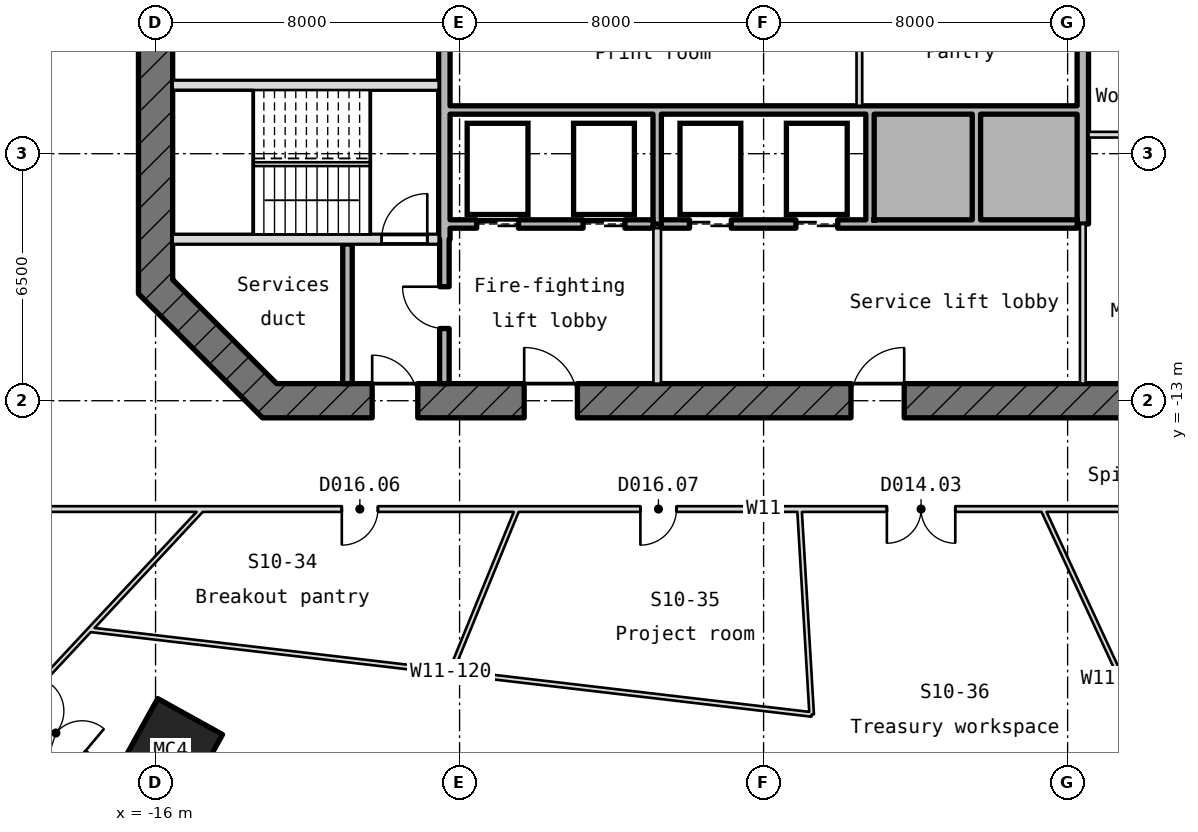
"""IFC4 building model, lengths in metres.
Left out: names, types, materials, properties, quantities, classifications, styles, units other than length and angle.
Written with IfcOpenShell. Run it as: python <this file> out.ifc"""

import sys

from ifc_helpers import new_model, si_unit, direction, frame, frame_2d, origin, origin_2d, place, context, subcontext, project, spatial, rectangle, hollow_rectangle, extrude, element, fill, save


model = new_model("IFC4")
c1 = context("Model", 3, precision=1e-05, world=origin(), true_north=direction((0.0, 1.0)))
c2 = subcontext(c1, "Body", "Model", "MODEL_VIEW")
j1 = project(units=[si_unit("LENGTHUNIT", "METRE"), si_unit("PLANEANGLEUNIT", "RADIAN")], contexts=[c1])
p1 = place(None, origin())
s1 = spatial("IfcSite", under=j1, at=p1, CompositionType="ELEMENT")
p2 = place(p1, origin())
s2 = spatial("IfcBuilding", under=s1, at=p2, CompositionType="ELEMENT")
p3 = place(p2, frame((0.0, 0.0, 161.05)))
s3 = spatial("IfcBuildingStorey", under=s2, at=p3, CompositionType="ELEMENT", Elevation=161.05)
p4 = place(p3, frame((-15.6, -22.228, -0.18), z_axis=(0.0, 0.0, 1.0), x_axis=(-0.874380139328, 0.485241560409, 0.0)))
e1 = element("IfcColumn", 1, at=p4, inside=s3, PredefinedType="COLUMN", context=c2, shape_type="SweptSolid", body=[
    extrude(hollow_rectangle(XDim=1.95, YDim=2.1, WallThickness=0.075, at=origin_2d()), origin(), (0.0, 0.0, 1.0), 4.15),
])
p5 = place(p3, frame((-25.554, -15.929, 0.0), z_axis=(0.0, 0.0, 1.0), x_axis=(0.766186960617, -0.642617725697, 0.0)))
e2 = element("IfcWall", 2, at=p5, inside=s3, PredefinedType="SOLIDWALL", context=c2, shape_type="SweptSolid", body=[
    extrude(rectangle(XDim=11.846, YDim=0.3, at=frame_2d((5.923, 0.0))), origin(), (0.0, 0.0, 1.0), 3.97),
])
p6 = place(p5, frame((8.146, 0.0, 0.0)))
e3 = element("IfcOpeningElement", 3, at=p6, cuts=e2, PredefinedType="OPENING", context=c2, shape_type="SweptSolid", body=[
    extrude(rectangle(XDim=1.8, YDim=2.4, at=frame_2d((0.9, 1.2))), frame((0.0, 0.16, 0.0), z_axis=(0.0, -1.0, 0.0), x_axis=(1.0, 0.0, 0.0)), (0.0, 0.0, 1.0), 0.32),
])
p7 = place(p5, frame((5.546, 0.0, 0.9)))
e4 = element("IfcOpeningElement", 4, at=p7, cuts=e2, PredefinedType="OPENING", context=c2, shape_type="SweptSolid", body=[
    extrude(rectangle(XDim=2.0, YDim=1.5, at=frame_2d((1.0, 0.75))), frame((0.0, 0.16, 0.0), z_axis=(0.0, -1.0, 0.0), x_axis=(1.0, 0.0, 0.0)), (0.0, 0.0, 1.0), 0.32),
])
p8 = place(p3, frame((-16.0, 10.186, -0.18), z_axis=(0.0, 0.0, 1.0), x_axis=(0.0, -1.0, 0.0)))
e5 = element("IfcWall", 5, at=p8, inside=s3, PredefinedType="SHEAR", context=c2, shape_type="SweptSolid", body=[
    extrude(rectangle(XDim=20.373, YDim=0.9, at=frame_2d((10.186, 0.0))), origin(), (0.0, 0.0, 1.0), 4.15),
])
p9 = place(p8, frame((8.986, 0.0, 0.18)))
e6 = element("IfcOpeningElement", 6, at=p9, cuts=e5, PredefinedType="OPENING", context=c2, shape_type="SweptSolid", body=[
    extrude(rectangle(XDim=2.4, YDim=2.1, at=frame_2d((1.2, 1.05))), frame((0.0, 0.46, 0.0), z_axis=(0.0, -1.0, 0.0), x_axis=(1.0, 0.0, 0.0)), (0.0, 0.0, 1.0), 0.92),
])
p10 = place(p8, frame((5.586, 0.0, 0.18)))
e7 = element("IfcOpeningElement", 7, at=p10, cuts=e5, PredefinedType="OPENING", context=c2, shape_type="SweptSolid", body=[
    extrude(rectangle(XDim=1.2, YDim=2.1, at=frame_2d((0.6, 1.05))), frame((0.0, 0.46, 0.0), z_axis=(0.0, -1.0, 0.0), x_axis=(1.0, 0.0, 0.0)), (0.0, 0.0, 1.0), 0.92),
])
p11 = place(p3, frame((-16.132, -9.868, -0.18), z_axis=(0.0, 0.0, 1.0), x_axis=(0.707106781187, -0.707106781187, 0.0)))
e8 = element("IfcWall", 8, at=p11, inside=s3, PredefinedType="SHEAR", context=c2, shape_type="SweptSolid", body=[
    extrude(rectangle(XDim=4.615, YDim=0.9, at=frame_2d((2.308, 0.0))), origin(), (0.0, 0.0, 1.0), 4.15),
])
p12 = place(p3, frame((-13.186, -13.0, -0.18), z_axis=(0.0, 0.0, 1.0), x_axis=(1.0, 0.0, 0.0)))
e9 = element("IfcWall", 9, at=p12, inside=s3, PredefinedType="SHEAR", context=c2, shape_type="SweptSolid", body=[
    extrude(rectangle(XDim=26.373, YDim=0.9, at=frame_2d((13.186, 0.0))), origin(), (0.0, 0.0, 1.0), 4.15),
])
p13 = place(p12, frame((2.886, 0.0, 0.18)))
e10 = element("IfcOpeningElement", 10, at=p13, cuts=e9, PredefinedType="OPENING", context=c2, shape_type="SweptSolid", body=[
    extrude(rectangle(XDim=1.2, YDim=2.1, at=frame_2d((0.6, 1.05))), frame((0.0, 0.46, 0.0), z_axis=(0.0, -1.0, 0.0), x_axis=(1.0, 0.0, 0.0)), (0.0, 0.0, 1.0), 0.92),
])
p14 = place(p12, frame((6.886, 0.0, 0.18)))
e11 = element("IfcOpeningElement", 11, at=p14, cuts=e9, PredefinedType="OPENING", context=c2, shape_type="SweptSolid", body=[
    extrude(rectangle(XDim=1.4, YDim=2.1, at=frame_2d((0.7, 1.05))), frame((0.0, 0.46, 0.0), z_axis=(0.0, -1.0, 0.0), x_axis=(1.0, 0.0, 0.0)), (0.0, 0.0, 1.0), 0.92),
])
p15 = place(p12, frame((15.486, 0.0, 0.18)))
e12 = element("IfcOpeningElement", 12, at=p15, cuts=e9, PredefinedType="OPENING", context=c2, shape_type="SweptSolid", body=[
    extrude(rectangle(XDim=1.4, YDim=2.1, at=frame_2d((0.7, 1.05))), frame((0.0, 0.46, 0.0), z_axis=(0.0, -1.0, 0.0), x_axis=(1.0, 0.0, 0.0)), (0.0, 0.0, 1.0), 0.92),
])
p16 = place(p3, frame((-15.55, -8.75, -0.18), z_axis=(0.0, 0.0, 1.0), x_axis=(1.0, 0.0, 0.0)))
e13 = element("IfcWall", 13, at=p16, inside=s3, PredefinedType="SHEAR", context=c2, shape_type="SweptSolid", body=[
    extrude(rectangle(XDim=7.0, YDim=0.25, at=frame_2d((3.5, 0.0))), origin(), (0.0, 0.0, 1.0), 4.15),
])
p17 = place(p16, frame((5.5, 0.0, 0.18)))
e14 = element("IfcOpeningElement", 14, at=p17, cuts=e13, PredefinedType="OPENING", context=c2, shape_type="SweptSolid", body=[
    extrude(rectangle(XDim=1.2, YDim=2.1, at=frame_2d((0.6, 1.05))), frame((0.0, 0.135, 0.0), z_axis=(0.0, -1.0, 0.0), x_axis=(1.0, 0.0, 0.0)), (0.0, 0.0, 1.0), 0.27),
])
p18 = place(p3, frame((-8.25, -8.35, 0.0), z_axis=(0.0, 0.0, 1.0), x_axis=(1.0, 0.0, 0.0)))
e15 = element("IfcWall", 15, at=p18, inside=s3, PredefinedType="STANDARD", context=c2, shape_type="SweptSolid", body=[
    extrude(rectangle(XDim=5.34, YDim=0.22, at=frame_2d((2.67, 0.0))), origin(), (0.0, 0.0, 1.0), 3.97),
])
p19 = place(p18, frame((0.7, 0.0, 0.0)))
e16 = element("IfcOpeningElement", 16, at=p19, cuts=e15, PredefinedType="OPENING", context=c2, shape_type="SweptSolid", body=[
    extrude(rectangle(XDim=1.1, YDim=2.1, at=frame_2d((0.55, 1.05))), frame((0.0, 0.12, 0.0), z_axis=(0.0, -1.0, 0.0), x_axis=(1.0, 0.0, 0.0)), (0.0, 0.0, 1.0), 0.24),
])
p20 = place(p18, frame((3.5, 0.0, 0.0)))
e17 = element("IfcOpeningElement", 17, at=p20, cuts=e15, PredefinedType="OPENING", context=c2, shape_type="SweptSolid", body=[
    extrude(rectangle(XDim=1.1, YDim=2.1, at=frame_2d((0.55, 1.05))), frame((0.0, 0.12, 0.0), z_axis=(0.0, -1.0, 0.0), x_axis=(1.0, 0.0, 0.0)), (0.0, 0.0, 1.0), 0.24),
])
p21 = place(p3, frame((-2.69, -8.35, 0.0), z_axis=(0.0, 0.0, 1.0), x_axis=(1.0, 0.0, 0.0)))
e18 = element("IfcWall", 18, at=p21, inside=s3, PredefinedType="STANDARD", context=c2, shape_type="SweptSolid", body=[
    extrude(rectangle(XDim=10.94, YDim=0.22, at=frame_2d((5.47, 0.0))), origin(), (0.0, 0.0, 1.0), 3.97),
])
p22 = place(p21, frame((0.74, 0.0, 0.0)))
e19 = element("IfcOpeningElement", 19, at=p22, cuts=e18, PredefinedType="OPENING", context=c2, shape_type="SweptSolid", body=[
    extrude(rectangle(XDim=1.1, YDim=2.1, at=frame_2d((0.55, 1.05))), frame((0.0, 0.12, 0.0), z_axis=(0.0, -1.0, 0.0), x_axis=(1.0, 0.0, 0.0)), (0.0, 0.0, 1.0), 0.24),
])
p23 = place(p21, frame((3.54, 0.0, 0.0)))
e20 = element("IfcOpeningElement", 20, at=p23, cuts=e18, PredefinedType="OPENING", context=c2, shape_type="SweptSolid", body=[
    extrude(rectangle(XDim=1.1, YDim=2.1, at=frame_2d((0.55, 1.05))), frame((0.0, 0.12, 0.0), z_axis=(0.0, -1.0, 0.0), x_axis=(1.0, 0.0, 0.0)), (0.0, 0.0, 1.0), 0.24),
])
p24 = place(p3, frame((8.55, -6.0, 0.0), z_axis=(0.0, 0.0, 1.0), x_axis=(1.0, 0.0, 0.0)))
e21 = element("IfcWall", 21, at=p24, inside=s3, PredefinedType="PARTITIONING", context=c2, shape_type="SweptSolid", body=[
    extrude(rectangle(XDim=4.075, YDim=0.15, at=frame_2d((2.038, 0.0))), origin(), (0.0, 0.0, 1.0), 3.97),
])
p25 = place(p3, frame((-8.25, -5.35, 0.0), z_axis=(0.0, 0.0, 1.0), x_axis=(1.0, 0.0, 0.0)))
e22 = element("IfcWall", 22, at=p25, inside=s3, PredefinedType="STANDARD", context=c2, shape_type="SweptSolid", body=[
    extrude(rectangle(XDim=16.5, YDim=0.22, at=frame_2d((8.25, 0.0))), origin(), (0.0, 0.0, 1.0), 3.97),
])
p26 = place(p3, frame((-15.55, -4.7, -0.18), z_axis=(0.0, 0.0, 1.0), x_axis=(1.0, 0.0, 0.0)))
e23 = element("IfcWall", 23, at=p26, inside=s3, PredefinedType="SHEAR", context=c2, shape_type="SweptSolid", body=[
    extrude(rectangle(XDim=7.0, YDim=0.25, at=frame_2d((3.5, 0.0))), origin(), (0.0, 0.0, 1.0), 4.15),
])
p27 = place(p3, frame((-10.95, -12.55, 0.0), z_axis=(0.0, 0.0, 1.0), x_axis=(0.0, 1.0, 0.0)))
e24 = element("IfcWall", 24, at=p27, inside=s3, PredefinedType="STANDARD", context=c2, shape_type="SweptSolid", body=[
    extrude(rectangle(XDim=3.675, YDim=0.25, at=frame_2d((1.837, 0.0))), origin(), (0.0, 0.0, 1.0), 3.97),
])
p28 = place(p3, frame((-8.4, -12.55, 0.0), z_axis=(0.0, 0.0, 1.0), x_axis=(0.0, 1.0, 0.0)))
e25 = element("IfcWall", 25, at=p28, inside=s3, PredefinedType="STANDARD", context=c2, shape_type="SweptSolid", body=[
    extrude(rectangle(XDim=3.8, YDim=0.25, at=frame_2d((1.9, 0.0))), origin(), (0.0, 0.0, 1.0), 3.97),
])
p29 = place(p28, frame((1.45, 0.0, 0.0)))
e26 = element("IfcOpeningElement", 26, at=p29, cuts=e25, PredefinedType="OPENING", context=c2, shape_type="SweptSolid", body=[
    extrude(rectangle(XDim=1.1, YDim=2.1, at=frame_2d((0.55, 1.05))), frame((0.0, 0.135, 0.0), z_axis=(0.0, -1.0, 0.0), x_axis=(1.0, 0.0, 0.0)), (0.0, 0.0, 1.0), 0.27),
])
p30 = place(p3, frame((-8.4, -8.75, -0.18), z_axis=(0.0, 0.0, 1.0), x_axis=(0.0, 1.0, 0.0)))
e27 = element("IfcWall", 27, at=p30, inside=s3, PredefinedType="SHEAR", context=c2, shape_type="SweptSolid", body=[
    extrude(rectangle(XDim=6.25, YDim=0.3, at=frame_2d((3.125, 0.0))), origin(), (0.0, 0.0, 1.0), 4.15),
])
p31 = place(p3, frame((-2.8, -12.55, 0.0), z_axis=(0.0, 0.0, 1.0), x_axis=(0.0, 1.0, 0.0)))
e28 = element("IfcWall", 28, at=p31, inside=s3, PredefinedType="PARTITIONING", context=c2, shape_type="SweptSolid", body=[
    extrude(rectangle(XDim=4.09, YDim=0.2, at=frame_2d((2.045, 0.0))), origin(), (0.0, 0.0, 1.0), 3.97),
])
p32 = place(p3, frame((-2.8, -8.35, 0.0), z_axis=(0.0, 0.0, 1.0), x_axis=(0.0, 1.0, 0.0)))
e29 = element("IfcWall", 29, at=p32, inside=s3, PredefinedType="STANDARD", context=c2, shape_type="SweptSolid", body=[
    extrude(rectangle(XDim=2.89, YDim=0.22, at=frame_2d((1.445, 0.0))), origin(), (0.0, 0.0, 1.0), 3.97),
])
p33 = place(p3, frame((2.52, -5.24, 0.0), z_axis=(0.0, 0.0, 1.0), x_axis=(0.0, 1.0, 0.0)))
e30 = element("IfcWall", 30, at=p33, inside=s3, PredefinedType="PARTITIONING", context=c2, shape_type="SweptSolid", body=[
    extrude(rectangle(XDim=2.74, YDim=0.15, at=frame_2d((1.37, 0.0))), origin(), (0.0, 0.0, 1.0), 3.97),
])
for number, where, z_axis, x_axis in (
    (31, (2.8, -8.24, 0.0), (0.0, 0.0, 1.0), (0.0, 1.0, 0.0)),
    (32, (5.6, -8.24, 0.0), (0.0, 0.0, 1.0), (0.0, 1.0, 0.0)),
):
    element("IfcWall", number, at=place(p3, frame(where, z_axis=z_axis, x_axis=x_axis)), inside=s3, PredefinedType="STANDARD", context=c2, shape_type="SweptSolid", body=[
        extrude(rectangle(XDim=2.78, YDim=0.22, at=frame_2d((1.39, 0.0))), origin(), (0.0, 0.0, 1.0), 3.97),
    ])
p34 = place(p3, frame((8.4, -12.55, 0.0), z_axis=(0.0, 0.0, 1.0), x_axis=(0.0, 1.0, 0.0)))
e33 = element("IfcWall", 33, at=p34, inside=s3, PredefinedType="PARTITIONING", context=c2, shape_type="SweptSolid", body=[
    extrude(rectangle(XDim=4.2, YDim=0.15, at=frame_2d((2.1, 0.0))), origin(), (0.0, 0.0, 1.0), 3.97),
])
p35 = place(p3, frame((8.4, -8.35, -0.18), z_axis=(0.0, 0.0, 1.0), x_axis=(0.0, 1.0, 0.0)))
e34 = element("IfcWall", 34, at=p35, inside=s3, PredefinedType="SHEAR", context=c2, shape_type="SweptSolid", body=[
    extrude(rectangle(XDim=5.85, YDim=0.3, at=frame_2d((2.925, 0.0))), origin(), (0.0, 0.0, 1.0), 4.15),
])
p36 = place(p3, frame((-17.729, -19.025, 0.0), z_axis=(0.0, 0.0, 1.0), x_axis=(0.99318471995, -0.116550899001, 0.0)))
e35 = element("IfcWall", 35, at=p36, inside=s3, PredefinedType="PARTITIONING", context=c2, shape_type="SweptSolid", body=[
    extrude(rectangle(XDim=19.125, YDim=0.12, at=frame_2d((9.562, 0.0))), origin(), (0.0, 0.0, 1.0), 3.97),
])
p37 = place(p3, frame((-14.77, -15.85, 0.0), z_axis=(0.0, 0.0, 1.0), x_axis=(-0.681748932873, -0.731586216742, 0.0)))
e36 = element("IfcWall", 36, at=p37, inside=s3, PredefinedType="PARTITIONING", context=c2, shape_type="SweptSolid", body=[
    extrude(rectangle(XDim=7.0, YDim=0.12, at=frame_2d((3.5, 0.0))), origin(), (0.0, 0.0, 1.0), 3.97),
])
p38 = place(p3, frame((-8.232, -20.14, 0.0), z_axis=(0.0, 0.0, 1.0), x_axis=(0.378310762155, 0.925678652253, 0.0)))
e37 = element("IfcWall", 37, at=p38, inside=s3, PredefinedType="PARTITIONING", context=c2, shape_type="SweptSolid", body=[
    extrude(rectangle(XDim=4.634, YDim=0.12, at=frame_2d((2.317, 0.0))), origin(), (0.0, 0.0, 1.0), 3.97),
])
p39 = place(p3, frame((1.265, -21.254, 0.0), z_axis=(0.0, 0.0, 1.0), x_axis=(-0.059435758529, 0.998232132627, 0.0)))
e38 = element("IfcWall", 38, at=p39, inside=s3, PredefinedType="PARTITIONING", context=c2, shape_type="SweptSolid", body=[
    extrude(rectangle(XDim=5.414, YDim=0.12, at=frame_2d((2.707, 0.0))), origin(), (0.0, 0.0, 1.0), 3.97),
])
p40 = place(p3, frame((7.345, -15.85, 0.0), z_axis=(0.0, 0.0, 1.0), x_axis=(0.420462507065, -0.90730991406, 0.0)))
e39 = element("IfcWall", 39, at=p40, inside=s3, PredefinedType="PARTITIONING", context=c2, shape_type="SweptSolid", body=[
    extrude(rectangle(XDim=9.841, YDim=0.12, at=frame_2d((4.921, 0.0))), origin(), (0.0, 0.0, 1.0), 3.426),
])
p41 = place(p3, frame((19.45, -15.85, 0.0), z_axis=(0.0, 0.0, 1.0), x_axis=(-1.0, 0.0, 0.0)))
e40 = element("IfcWall", 40, at=p41, inside=s3, PredefinedType="PARTITIONING", context=c2, shape_type="SweptSolid", body=[
    extrude(rectangle(XDim=38.9, YDim=0.15, at=frame_2d((19.45, 0.0))), origin(), (0.0, 0.0, 1.0), 3.97),
])
p42 = place(p41, frame((29.599, 0.0, 0.0)))
e41 = element("IfcOpeningElement", 41, at=p42, cuts=e40, PredefinedType="OPENING", context=c2, shape_type="SweptSolid", body=[
    extrude(rectangle(XDim=0.95, YDim=2.1, at=frame_2d((0.475, 1.05))), frame((0.0, 0.085, 0.0), z_axis=(0.0, -1.0, 0.0), x_axis=(1.0, 0.0, 0.0)), (0.0, 0.0, 1.0), 0.17),
])
p43 = place(p41, frame((21.742, 0.0, 0.0)))
e42 = element("IfcOpeningElement", 42, at=p43, cuts=e40, PredefinedType="OPENING", context=c2, shape_type="SweptSolid", body=[
    extrude(rectangle(XDim=0.95, YDim=2.1, at=frame_2d((0.475, 1.05))), frame((0.0, 0.085, 0.0), z_axis=(0.0, -1.0, 0.0), x_axis=(1.0, 0.0, 0.0)), (0.0, 0.0, 1.0), 0.17),
])
p44 = place(p41, frame((14.406, 0.0, 0.0)))
e43 = element("IfcOpeningElement", 43, at=p44, cuts=e40, PredefinedType="OPENING", context=c2, shape_type="SweptSolid", body=[
    extrude(rectangle(XDim=1.8, YDim=2.1, at=frame_2d((0.9, 1.05))), frame((0.0, 0.085, 0.0), z_axis=(0.0, -1.0, 0.0), x_axis=(1.0, 0.0, 0.0)), (0.0, 0.0, 1.0), 0.17),
])
p45 = place(p6, origin())
e44 = element("IfcDoor", 44, at=p45, inside=s3, OperationType="SINGLE_SWING_LEFT", PredefinedType="DOOR", context=c2, shape_type="SweptSolid", body=[
    extrude(rectangle(XDim=1.8, YDim=2.4, at=frame_2d((0.9, 1.2))), frame((0.0, 0.025, 0.0), z_axis=(0.0, -1.0, 0.0), x_axis=(1.0, 0.0, 0.0)), (0.0, 0.0, 1.0), 0.05),
])
fill(e3, e44)
p46 = place(p19, origin())
e45 = element("IfcDoor", 45, at=p46, inside=s3, OperationType="DOUBLE_DOOR_SLIDING", PredefinedType="DOOR", context=c2, shape_type="SweptSolid", body=[
    extrude(rectangle(XDim=1.1, YDim=2.1, at=frame_2d((0.55, 1.05))), frame((0.0, 0.025, 0.0), z_axis=(0.0, -1.0, 0.0), x_axis=(1.0, 0.0, 0.0)), (0.0, 0.0, 1.0), 0.05),
])
fill(e16, e45)
p47 = place(p20, origin())
e46 = element("IfcDoor", 46, at=p47, inside=s3, OperationType="DOUBLE_DOOR_SLIDING", PredefinedType="DOOR", context=c2, shape_type="SweptSolid", body=[
    extrude(rectangle(XDim=1.1, YDim=2.1, at=frame_2d((0.55, 1.05))), frame((0.0, 0.025, 0.0), z_axis=(0.0, -1.0, 0.0), x_axis=(1.0, 0.0, 0.0)), (0.0, 0.0, 1.0), 0.05),
])
fill(e17, e46)
p48 = place(p22, origin())
e47 = element("IfcDoor", 47, at=p48, inside=s3, OperationType="DOUBLE_DOOR_SLIDING", PredefinedType="DOOR", context=c2, shape_type="SweptSolid", body=[
    extrude(rectangle(XDim=1.1, YDim=2.1, at=frame_2d((0.55, 1.05))), frame((0.0, 0.025, 0.0), z_axis=(0.0, -1.0, 0.0), x_axis=(1.0, 0.0, 0.0)), (0.0, 0.0, 1.0), 0.05),
])
fill(e19, e47)
p49 = place(p23, origin())
e48 = element("IfcDoor", 48, at=p49, inside=s3, OperationType="DOUBLE_DOOR_SLIDING", PredefinedType="DOOR", context=c2, shape_type="SweptSolid", body=[
    extrude(rectangle(XDim=1.1, YDim=2.1, at=frame_2d((0.55, 1.05))), frame((0.0, 0.025, 0.0), z_axis=(0.0, -1.0, 0.0), x_axis=(1.0, 0.0, 0.0)), (0.0, 0.0, 1.0), 0.05),
])
fill(e20, e48)
p50 = place(p17, origin())
e49 = element("IfcDoor", 49, at=p50, inside=s3, OperationType="SINGLE_SWING_RIGHT", PredefinedType="DOOR", context=c2, shape_type="SweptSolid", body=[
    extrude(rectangle(XDim=1.2, YDim=2.1, at=frame_2d((0.6, 1.05))), frame((0.0, 0.025, 0.0), z_axis=(0.0, -1.0, 0.0), x_axis=(1.0, 0.0, 0.0)), (0.0, 0.0, 1.0), 0.05),
])
fill(e14, e49)
p51 = place(p29, origin())
e50 = element("IfcDoor", 50, at=p51, inside=s3, OperationType="SINGLE_SWING_RIGHT", PredefinedType="DOOR", context=c2, shape_type="SweptSolid", body=[
    extrude(rectangle(XDim=1.1, YDim=2.1, at=frame_2d((0.55, 1.05))), frame((0.0, 0.025, 0.0), z_axis=(0.0, -1.0, 0.0), x_axis=(1.0, 0.0, 0.0)), (0.0, 0.0, 1.0), 0.05),
])
fill(e26, e50)
p52 = place(p13, origin())
e51 = element("IfcDoor", 51, at=p52, inside=s3, OperationType="SINGLE_SWING_RIGHT", PredefinedType="DOOR", context=c2, shape_type="SweptSolid", body=[
    extrude(rectangle(XDim=1.2, YDim=2.1, at=frame_2d((0.6, 1.05))), frame((0.0, 0.025, 0.0), z_axis=(0.0, -1.0, 0.0), x_axis=(1.0, 0.0, 0.0)), (0.0, 0.0, 1.0), 0.05),
])
fill(e10, e51)
p53 = place(p14, origin())
e52 = element("IfcDoor", 52, at=p53, inside=s3, OperationType="SINGLE_SWING_RIGHT", PredefinedType="DOOR", context=c2, shape_type="SweptSolid", body=[
    extrude(rectangle(XDim=1.4, YDim=2.1, at=frame_2d((0.7, 1.05))), frame((0.0, 0.025, 0.0), z_axis=(0.0, -1.0, 0.0), x_axis=(1.0, 0.0, 0.0)), (0.0, 0.0, 1.0), 0.05),
])
fill(e11, e52)
p54 = place(p15, origin())
e53 = element("IfcDoor", 53, at=p54, inside=s3, OperationType="SINGLE_SWING_RIGHT", PredefinedType="DOOR", context=c2, shape_type="SweptSolid", body=[
    extrude(rectangle(XDim=1.4, YDim=2.1, at=frame_2d((0.7, 1.05))), frame((0.0, 0.025, 0.0), z_axis=(0.0, -1.0, 0.0), x_axis=(1.0, 0.0, 0.0)), (0.0, 0.0, 1.0), 0.05),
])
fill(e12, e53)
p55 = place(p42, origin())
e54 = element("IfcDoor", 54, at=p55, inside=s3, OperationType="SINGLE_SWING_RIGHT", PredefinedType="DOOR", context=c2, shape_type="SweptSolid", body=[
    extrude(rectangle(XDim=0.95, YDim=2.1, at=frame_2d((0.475, 1.05))), frame((0.0, 0.025, 0.0), z_axis=(0.0, -1.0, 0.0), x_axis=(1.0, 0.0, 0.0)), (0.0, 0.0, 1.0), 0.05),
])
fill(e41, e54)
p56 = place(p43, origin())
e55 = element("IfcDoor", 55, at=p56, inside=s3, OperationType="SINGLE_SWING_RIGHT", PredefinedType="DOOR", context=c2, shape_type="SweptSolid", body=[
    extrude(rectangle(XDim=0.95, YDim=2.1, at=frame_2d((0.475, 1.05))), frame((0.0, 0.025, 0.0), z_axis=(0.0, -1.0, 0.0), x_axis=(1.0, 0.0, 0.0)), (0.0, 0.0, 1.0), 0.05),
])
fill(e42, e55)
p57 = place(p44, origin())
e56 = element("IfcDoor", 56, at=p57, inside=s3, OperationType="DOUBLE_DOOR_SINGLE_SWING", PredefinedType="DOOR", context=c2, shape_type="SweptSolid", body=[
    extrude(rectangle(XDim=1.8, YDim=2.1, at=frame_2d((0.9, 1.05))), frame((0.0, 0.025, 0.0), z_axis=(0.0, -1.0, 0.0), x_axis=(1.0, 0.0, 0.0)), (0.0, 0.0, 1.0), 0.05),
])
fill(e43, e56)
save(model, sys.argv[1])
